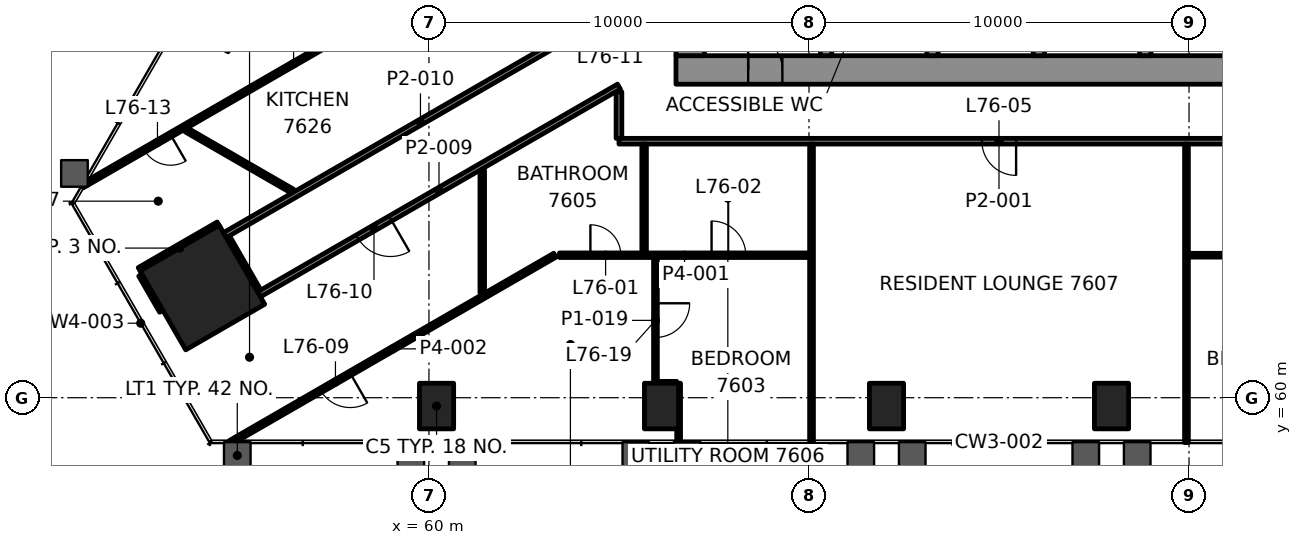
"""IFC4 building model, lengths in metres.
Left out: names, types, materials, properties, quantities, classifications, styles, units other than length and angle.
Written with IfcOpenShell. Run it as: python <this file> out.ifc"""

import sys

from ifc_helpers import new_model, si_unit, direction, frame, frame_2d, origin, origin_2d, place, context, subcontext, project, spatial, rectangle, hollow_rectangle, extrude, element, fill, save


model = new_model("IFC4")
c1 = context("Model", 3, precision=1e-05, world=origin(), true_north=direction((0.0, 1.0)))
c2 = subcontext(c1, "Body", "Model", "MODEL_VIEW")
j1 = project(units=[si_unit("LENGTHUNIT", "METRE"), si_unit("PLANEANGLEUNIT", "RADIAN")], contexts=[c1])
p1 = place(None, origin())
s1 = spatial("IfcSite", under=j1, at=p1, CompositionType="ELEMENT")
p2 = place(p1, origin())
s2 = spatial("IfcBuilding", under=s1, at=p2, CompositionType="ELEMENT")
p3 = place(p2, frame((0.0, 0.0, 312.6)))
s3 = spatial("IfcBuildingStorey", under=s2, at=p3, CompositionType="ELEMENT", Elevation=312.6)
p4 = place(p3, frame((54.039, 62.898, 0.0), z_axis=(0.0, 0.0, 1.0), x_axis=(0.5, -0.866025403784, 0.0)))
e1 = element("IfcColumn", 1, at=p4, inside=s3, PredefinedType="COLUMN", context=c2, shape_type="SweptSolid", body=[
    extrude(rectangle(XDim=2.4, YDim=2.4, at=origin_2d()), origin(), (0.0, 0.0, 1.0), 3.5),
])
for number, where, z_axis, x_axis in (
    (2, (60.2, 59.78, -0.0), (0.0, 0.0, 1.0), (1.0, 0.0, 0.0)),
    (3, (66.12, 59.78, -0.0), (0.0, 0.0, 1.0), (1.0, 0.0, 0.0)),
    (4, (72.04, 59.78, -0.0), (0.0, 0.0, 1.0), (1.0, 0.0, 0.0)),
    (5, (77.96, 59.78, -0.0), (0.0, 0.0, 1.0), (1.0, 0.0, 0.0)),
):
    element("IfcColumn", number, at=place(p3, frame(where, z_axis=z_axis, x_axis=x_axis)), inside=s3, PredefinedType="COLUMN", context=c2, shape_type="SweptSolid", body=[
        extrude(hollow_rectangle(XDim=0.9, YDim=1.2, WallThickness=0.06, at=origin_2d()), origin(), (0.0, 0.0, 1.0), 3.5),
    ])
p5 = place(p3, frame((66.5, 68.625, 0.0), z_axis=(0.0, 0.0, 1.0), x_axis=(1.0, 0.0, 0.0)))
e6 = element("IfcWall", 6, at=p5, inside=s3, PredefinedType="SHEAR", context=c2, shape_type="SweptSolid", body=[
    extrude(rectangle(XDim=17.0, YDim=0.75, at=frame_2d((8.5, 0.0))), origin(), (0.0, 0.0, 1.0), 3.3),
])
p6 = place(p5, frame((1.9, 0.0, 0.0)))
e7 = element("IfcOpeningElement", 7, at=p6, cuts=e6, PredefinedType="OPENING", context=c2, shape_type="SweptSolid", body=[
    extrude(rectangle(XDim=0.9, YDim=2.1, at=frame_2d((0.45, 1.05))), frame((0.0, 0.385, 0.0), z_axis=(0.0, -1.0, 0.0), x_axis=(1.0, 0.0, 0.0)), (0.0, 0.0, 1.0), 0.77),
])
p7 = place(p3, frame((66.875, 69.0, 0.0), z_axis=(0.0, 0.0, 1.0), x_axis=(0.0, 1.0, 0.0)))
e8 = element("IfcWall", 8, at=p7, inside=s3, PredefinedType="SHEAR", context=c2, shape_type="SweptSolid", body=[
    extrude(rectangle(XDim=12.0, YDim=0.75, at=frame_2d((6.0, 0.0))), origin(), (0.0, 0.0, 1.0), 3.3),
])
p8 = place(p7, frame((3.7, 0.0, 0.0)))
e9 = element("IfcOpeningElement", 9, at=p8, cuts=e8, PredefinedType="OPENING", context=c2, shape_type="SweptSolid", body=[
    extrude(rectangle(XDim=1.2, YDim=2.1, at=frame_2d((0.6, 1.05))), frame((0.0, 0.385, 0.0), z_axis=(0.0, -1.0, 0.0), x_axis=(1.0, 0.0, 0.0)), (0.0, 0.0, 1.0), 0.77),
])
for number, where, z_axis, x_axis in (
    (10, (70.45, 69.0, 0.0), (0.0, 0.0, 1.0), (0.0, 1.0, 0.0)),
    (11, (73.25, 69.0, 0.0), (0.0, 0.0, 1.0), (0.0, 1.0, 0.0)),
    (12, (76.05, 69.0, 0.0), (0.0, 0.0, 1.0), (0.0, 1.0, 0.0)),
    (13, (78.85, 69.0, 0.0), (0.0, 0.0, 1.0), (0.0, 1.0, 0.0)),
):
    element("IfcWall", number, at=place(p3, frame(where, z_axis=z_axis, x_axis=x_axis)), inside=s3, PredefinedType="SHEAR", context=c2, shape_type="SweptSolid", body=[
        extrude(rectangle(XDim=2.6, YDim=0.3, at=frame_2d((1.3, 0.0))), origin(), (0.0, 0.0, 1.0), 3.3),
    ])
p9 = place(p3, frame((66.02, 60.38, 0.0), z_axis=(0.0, 0.0, 1.0), x_axis=(1.0, 0.0, 0.0)))
e14 = element("IfcWall", 14, at=p9, inside=s3, PredefinedType="PARTITIONING", context=c2, shape_type="SweptSolid", body=[
    extrude(rectangle(XDim=0.5, YDim=0.1, at=frame_2d((0.25, 0.0))), origin(), (0.0, 0.0, 1.0), 2.7),
])
p10 = place(p3, frame((63.434, 63.75, 0.0), z_axis=(0.0, 0.0, 1.0), x_axis=(1.0, 0.0, 0.0)))
e15 = element("IfcWall", 15, at=p10, inside=s3, PredefinedType="PARTITIONING", context=c2, shape_type="SweptSolid", body=[
    extrude(rectangle(XDim=6.582, YDim=0.12, at=frame_2d((3.291, 0.0))), origin(), (0.0, 0.0, 1.0), 2.7),
])
p11 = place(p10, frame((0.814, 0.0, 0.0)))
e16 = element("IfcOpeningElement", 16, at=p11, cuts=e15, PredefinedType="OPENING", context=c2, shape_type="SweptSolid", body=[
    extrude(rectangle(XDim=0.8, YDim=2.1, at=frame_2d((0.4, 1.05))), frame((0.0, 0.07, 0.0), z_axis=(0.0, -1.0, 0.0), x_axis=(1.0, 0.0, 0.0)), (0.0, 0.0, 1.0), 0.14),
])
p12 = place(p10, frame((4.002, 0.0, 0.0)))
e17 = element("IfcOpeningElement", 17, at=p12, cuts=e15, PredefinedType="OPENING", context=c2, shape_type="SweptSolid", body=[
    extrude(rectangle(XDim=0.9, YDim=2.1, at=frame_2d((0.45, 1.05))), frame((0.0, 0.07, 0.0), z_axis=(0.0, -1.0, 0.0), x_axis=(1.0, 0.0, 0.0)), (0.0, 0.0, 1.0), 0.14),
])
p13 = place(p3, frame((86.566, 63.75, 0.0), z_axis=(0.0, 0.0, 1.0), x_axis=(-1.0, 0.0, 0.0)))
e18 = element("IfcWall", 18, at=p13, inside=s3, PredefinedType="PARTITIONING", context=c2, shape_type="SweptSolid", body=[
    extrude(rectangle(XDim=6.582, YDim=0.1, at=frame_2d((3.291, 0.0))), origin(), (0.0, 0.0, 1.0), 2.7),
])
p14 = place(p13, frame((0.913, 0.0, 0.0)))
e19 = element("IfcOpeningElement", 19, at=p14, cuts=e18, PredefinedType="OPENING", context=c2, shape_type="SweptSolid", body=[
    extrude(rectangle(XDim=0.9, YDim=2.1, at=frame_2d((0.45, 1.05))), frame((0.0, 0.06, 0.0), z_axis=(0.0, -1.0, 0.0), x_axis=(1.0, 0.0, 0.0)), (0.0, 0.0, 1.0), 0.12),
])
p15 = place(p3, frame((85.0, 66.75, 0.0), z_axis=(0.0, 0.0, 1.0), x_axis=(-1.0, 0.0, 0.0)))
e20 = element("IfcWall", 20, at=p15, inside=s3, PredefinedType="PARTITIONING", context=c2, shape_type="SweptSolid", body=[
    extrude(rectangle(XDim=20.0, YDim=0.15, at=frame_2d((10.0, 0.0))), origin(), (0.0, 0.0, 1.0), 2.7),
])
p16 = place(p15, frame((2.135, 0.0, 0.0)))
e21 = element("IfcOpeningElement", 21, at=p16, cuts=e20, PredefinedType="OPENING", context=c2, shape_type="SweptSolid", body=[
    extrude(rectangle(XDim=1.0, YDim=2.1, at=frame_2d((0.5, 1.05))), frame((0.0, 0.085, 0.0), z_axis=(0.0, -1.0, 0.0), x_axis=(1.0, 0.0, 0.0)), (0.0, 0.0, 1.0), 0.17),
])
p17 = place(p15, frame((9.55, 0.0, 0.0)))
e22 = element("IfcOpeningElement", 22, at=p17, cuts=e20, PredefinedType="OPENING", context=c2, shape_type="SweptSolid", body=[
    extrude(rectangle(XDim=0.9, YDim=2.1, at=frame_2d((0.45, 1.05))), frame((0.0, 0.085, 0.0), z_axis=(0.0, -1.0, 0.0), x_axis=(1.0, 0.0, 0.0)), (0.0, 0.0, 1.0), 0.17),
])
p18 = place(p3, frame((63.314, 63.75, 0.0), z_axis=(0.0, 0.0, 1.0), x_axis=(-0.866028066272, -0.499995388408, 0.0)))
e23 = element("IfcWall", 23, at=p18, inside=s3, PredefinedType="PARTITIONING", context=c2, shape_type="SweptSolid", body=[
    extrude(rectangle(XDim=9.859, YDim=0.12, at=frame_2d((4.93, 0.0))), origin(), (0.0, 0.0, 1.0), 2.7),
])
p19 = place(p18, frame((6.218, 0.0, 0.0)))
e24 = element("IfcOpeningElement", 24, at=p19, cuts=e23, PredefinedType="OPENING", context=c2, shape_type="SweptSolid", body=[
    extrude(rectangle(XDim=0.9, YDim=2.1, at=frame_2d((0.45, 1.05))), frame((0.0, 0.07, 0.0), z_axis=(0.0, -1.0, 0.0), x_axis=(1.0, 0.0, 0.0)), (0.0, 0.0, 1.0), 0.14),
])
p20 = place(p3, frame((65.0, 68.187, 0.0), z_axis=(0.0, 0.0, 1.0), x_axis=(-0.866028339337, -0.499994915439, 0.0)))
e25 = element("IfcWall", 25, at=p20, inside=s3, PredefinedType="PARTITIONING", context=c2, shape_type="SweptSolid", body=[
    extrude(rectangle(XDim=10.937, YDim=0.15, at=frame_2d((5.468, 0.0))), origin(), (0.0, 0.0, 1.0), 2.697),
])
p21 = place(p20, frame((6.943, 0.0, 0.0)))
e26 = element("IfcOpeningElement", 26, at=p21, cuts=e25, PredefinedType="OPENING", context=c2, shape_type="SweptSolid", body=[
    extrude(rectangle(XDim=1.0, YDim=2.1, at=frame_2d((0.5, 1.05))), frame((0.0, 0.085, 0.0), z_axis=(0.0, -1.0, 0.0), x_axis=(1.0, 0.0, 0.0)), (0.0, 0.0, 1.0), 0.17),
])
p22 = place(p3, frame((54.628, 64.278, 0.0), z_axis=(0.0, 0.0, 1.0), x_axis=(0.866033426221, 0.499986104476, 0.0)))
e27 = element("IfcWall", 27, at=p22, inside=s3, PredefinedType="PARTITIONING", context=c2, shape_type="SweptSolid", body=[
    extrude(rectangle(XDim=11.89, YDim=0.15, at=frame_2d((5.945, 0.0))), origin(), (0.0, 0.0, 1.0), 2.7),
])
p23 = place(p22, frame((10.612, 0.0, 0.0)))
e28 = element("IfcOpeningElement", 28, at=p23, cuts=e27, PredefinedType="OPENING", context=c2, shape_type="SweptSolid", body=[
    extrude(rectangle(XDim=1.0, YDim=2.1, at=frame_2d((0.5, 1.05))), frame((0.0, 0.085, 0.0), z_axis=(0.0, -1.0, 0.0), x_axis=(1.0, 0.0, 0.0)), (0.0, 0.0, 1.0), 0.17),
])
p24 = place(p3, frame((52.4, 63.337, 0.0), z_axis=(0.0, 0.0, 1.0), x_axis=(0.866024647952, 0.500001309137, 0.0)))
e29 = element("IfcWall", 29, at=p24, inside=s3, PredefinedType="PARTITIONING", context=c2, shape_type="SweptSolid", body=[
    extrude(rectangle(XDim=2.4, YDim=0.2, at=frame_2d((1.2, 0.0))), origin(), (0.0, 0.0, 1.0), 2.7),
])
p25 = place(p3, frame((62.0, 71.998, 0.0), z_axis=(0.0, 0.0, 1.0), x_axis=(-0.866023842607, -0.500002704028, 0.0)))
e30 = element("IfcWall", 30, at=p25, inside=s3, PredefinedType="PARTITIONING", context=c2, shape_type="SweptSolid", body=[
    extrude(rectangle(XDim=12.845, YDim=0.12, at=frame_2d((6.422, 0.0))), origin(), (0.0, 0.0, 1.0), 2.7),
])
p26 = place(p25, frame((0.421, 0.0, 0.0)))
e31 = element("IfcOpeningElement", 31, at=p26, cuts=e30, PredefinedType="OPENING", context=c2, shape_type="SweptSolid", body=[
    extrude(rectangle(XDim=0.8, YDim=2.1, at=frame_2d((0.4, 1.05))), frame((0.0, 0.07, 0.0), z_axis=(0.0, -1.0, 0.0), x_axis=(1.0, 0.0, 0.0)), (0.0, 0.0, 1.0), 0.14),
])
p27 = place(p25, frame((10.158, 0.0, 0.0)))
e32 = element("IfcOpeningElement", 32, at=p27, cuts=e30, PredefinedType="OPENING", context=c2, shape_type="SweptSolid", body=[
    extrude(rectangle(XDim=0.8, YDim=2.1, at=frame_2d((0.4, 1.05))), frame((0.0, 0.07, 0.0), z_axis=(0.0, -1.0, 0.0), x_axis=(1.0, 0.0, 0.0)), (0.0, 0.0, 1.0), 0.14),
])
for number, where, z_axis, x_axis in (
    (33, (79.933, 58.82, 0.0), (0.0, 0.0, 1.0), (0.0, 1.0, 0.0)),
    (34, (70.067, 58.82, 0.0), (0.0, 0.0, 1.0), (0.0, 1.0, 0.0)),
):
    element("IfcWall", number, at=place(p3, frame(where, z_axis=z_axis, x_axis=x_axis)), inside=s3, PredefinedType="PARTITIONING", context=c2, shape_type="SweptSolid", body=[
        extrude(rectangle(XDim=7.855, YDim=0.1, at=frame_2d((3.927, 0.0))), origin(), (0.0, 0.0, 1.0), 2.688),
    ])
p28 = place(p3, frame((66.57, 58.82, 0.0), z_axis=(0.0, 0.0, 1.0), x_axis=(0.0, 1.0, 0.0)))
e35 = element("IfcWall", 35, at=p28, inside=s3, PredefinedType="PARTITIONING", context=c2, shape_type="SweptSolid", body=[
    extrude(rectangle(XDim=1.56, YDim=0.1, at=frame_2d((0.78, 0.0))), origin(), (0.0, 0.0, 1.0), 2.688),
])
p29 = place(p3, frame((65.96, 63.69, 0.0), z_axis=(0.0, 0.0, 1.0), x_axis=(0.0, -1.0, 0.0)))
e36 = element("IfcWall", 36, at=p29, inside=s3, PredefinedType="PARTITIONING", context=c2, shape_type="SweptSolid", body=[
    extrude(rectangle(XDim=3.31, YDim=0.1, at=frame_2d((1.655, 0.0))), origin(), (0.0, 0.0, 1.0), 2.7),
])
p30 = place(p29, frame((1.205, 0.0, 0.0)))
e37 = element("IfcOpeningElement", 37, at=p30, cuts=e36, PredefinedType="OPENING", context=c2, shape_type="SweptSolid", body=[
    extrude(rectangle(XDim=0.9, YDim=2.1, at=frame_2d((0.45, 1.05))), frame((0.0, 0.06, 0.0), z_axis=(0.0, -1.0, 0.0), x_axis=(1.0, 0.0, 0.0)), (0.0, 0.0, 1.0), 0.12),
])
p31 = place(p3, frame((65.662, 63.81, 0.0), z_axis=(0.0, 0.0, 1.0), x_axis=(0.0, 1.0, 0.0)))
e38 = element("IfcWall", 38, at=p31, inside=s3, PredefinedType="PARTITIONING", context=c2, shape_type="SweptSolid", body=[
    extrude(rectangle(XDim=2.865, YDim=0.12, at=frame_2d((1.433, 0.0))), origin(), (0.0, 0.0, 1.0), 2.7),
])
p32 = place(p3, frame((65.0, 66.825, 0.0), z_axis=(0.0, 0.0, 1.0), x_axis=(0.0, 1.0, 0.0)))
e39 = element("IfcWall", 39, at=p32, inside=s3, PredefinedType="PARTITIONING", context=c2, shape_type="SweptSolid", body=[
    extrude(rectangle(XDim=1.226, YDim=0.15, at=frame_2d((0.613, 0.0))), origin(), (0.0, 0.0, 1.0), 2.697),
])
p33 = place(p3, frame((61.403, 62.756, 0.0), z_axis=(0.0, 0.0, 1.0), x_axis=(0.0, 1.0, 0.0)))
e40 = element("IfcWall", 40, at=p33, inside=s3, PredefinedType="PARTITIONING", context=c2, shape_type="SweptSolid", body=[
    extrude(rectangle(XDim=3.228, YDim=0.12, at=frame_2d((1.614, 0.0))), origin(), (0.0, 0.0, 1.0), 2.697),
])
p34 = place(p3, frame((55.49, 62.784, 0.0), z_axis=(0.0, 0.0, 1.0), x_axis=(-0.499970888758, 0.866042210515, 0.0)))
e41 = element("IfcWall", 41, at=p34, inside=s3, PredefinedType="PARTITIONING", context=c2, shape_type="SweptSolid", body=[
    extrude(rectangle(XDim=1.645, YDim=0.2, at=frame_2d((0.822, 0.0))), origin(), (0.0, 0.0, 1.0), 2.697),
])
p35 = place(p3, frame((53.0, 62.298, 0.0), z_axis=(0.0, 0.0, 1.0), x_axis=(-0.50002983664, 0.866008176907, 0.0)))
e42 = element("IfcWall", 42, at=p35, inside=s3, PredefinedType="PARTITIONING", context=c2, shape_type="SweptSolid", body=[
    extrude(rectangle(XDim=1.1, YDim=0.2, at=frame_2d((0.55, 0.0))), origin(), (0.0, 0.0, 1.0), 2.7),
])
p36 = place(p3, frame((56.41, 65.433, 0.0), z_axis=(0.0, 0.0, 1.0), x_axis=(-0.866000447062, 0.500043223821, 0.0)))
e43 = element("IfcWall", 43, at=p36, inside=s3, PredefinedType="PARTITIONING", context=c2, shape_type="SweptSolid", body=[
    extrude(rectangle(XDim=3.228, YDim=0.12, at=frame_2d((1.614, 0.0))), origin(), (0.0, 0.0, 1.0), 2.7),
])
p37 = place(p11, origin())
e44 = element("IfcDoor", 44, at=p37, inside=s3, OperationType="SINGLE_SWING_RIGHT", PredefinedType="DOOR", context=c2, shape_type="SweptSolid", body=[
    extrude(rectangle(XDim=0.8, YDim=2.1, at=frame_2d((0.4, 1.05))), frame((0.0, 0.025, 0.0), z_axis=(0.0, -1.0, 0.0), x_axis=(1.0, 0.0, 0.0)), (0.0, 0.0, 1.0), 0.05),
])
fill(e16, e44)
p38 = place(p12, origin())
e45 = element("IfcDoor", 45, at=p38, inside=s3, OperationType="SINGLE_SWING_LEFT", PredefinedType="DOOR", context=c2, shape_type="SweptSolid", body=[
    extrude(rectangle(XDim=0.9, YDim=2.1, at=frame_2d((0.45, 1.05))), frame((0.0, 0.025, 0.0), z_axis=(0.0, -1.0, 0.0), x_axis=(1.0, 0.0, 0.0)), (0.0, 0.0, 1.0), 0.05),
])
fill(e17, e45)
p39 = place(p17, origin())
e46 = element("IfcDoor", 46, at=p39, inside=s3, OperationType="SINGLE_SWING_LEFT", PredefinedType="DOOR", context=c2, shape_type="SweptSolid", body=[
    extrude(rectangle(XDim=0.9, YDim=2.1, at=frame_2d((0.45, 1.05))), frame((0.0, 0.025, 0.0), z_axis=(0.0, -1.0, 0.0), x_axis=(1.0, 0.0, 0.0)), (0.0, 0.0, 1.0), 0.05),
])
fill(e22, e46)
p40 = place(p19, origin())
e47 = element("IfcDoor", 47, at=p40, inside=s3, OperationType="SINGLE_SWING_RIGHT", PredefinedType="DOOR", context=c2, shape_type="SweptSolid", body=[
    extrude(rectangle(XDim=0.9, YDim=2.1, at=frame_2d((0.45, 1.05))), frame((0.0, 0.025, 0.0), z_axis=(0.0, -1.0, 0.0), x_axis=(1.0, 0.0, 0.0)), (0.0, 0.0, 1.0), 0.05),
])
fill(e24, e47)
p41 = place(p21, origin())
e48 = element("IfcDoor", 48, at=p41, inside=s3, OperationType="SINGLE_SWING_LEFT", PredefinedType="DOOR", context=c2, shape_type="SweptSolid", body=[
    extrude(rectangle(XDim=1.0, YDim=2.1, at=frame_2d((0.5, 1.05))), frame((0.0, 0.025, 0.0), z_axis=(0.0, -1.0, 0.0), x_axis=(1.0, 0.0, 0.0)), (0.0, 0.0, 1.0), 0.05),
])
fill(e26, e48)
p42 = place(p27, origin())
e49 = element("IfcDoor", 49, at=p42, inside=s3, OperationType="SINGLE_SWING_RIGHT", PredefinedType="DOOR", context=c2, shape_type="SweptSolid", body=[
    extrude(rectangle(XDim=0.8, YDim=2.1, at=frame_2d((0.4, 1.05))), frame((0.0, 0.025, 0.0), z_axis=(0.0, -1.0, 0.0), x_axis=(1.0, 0.0, 0.0)), (0.0, 0.0, 1.0), 0.05),
])
fill(e32, e49)
p43 = place(p30, origin())
e50 = element("IfcDoor", 50, at=p43, inside=s3, OperationType="SINGLE_SWING_RIGHT", PredefinedType="DOOR", context=c2, shape_type="SweptSolid", body=[
    extrude(rectangle(XDim=0.9, YDim=2.1, at=frame_2d((0.45, 1.05))), frame((0.0, 0.025, 0.0), z_axis=(0.0, -1.0, 0.0), x_axis=(1.0, 0.0, 0.0)), (0.0, 0.0, 1.0), 0.05),
])
fill(e37, e50)
p44 = place(p6, origin())
e51 = element("IfcDoor", 51, at=p44, inside=s3, OperationType="SINGLE_SWING_RIGHT", PredefinedType="DOOR", context=c2, shape_type="SweptSolid", body=[
    extrude(rectangle(XDim=0.9, YDim=2.1, at=frame_2d((0.45, 1.05))), frame((0.0, 0.095, 0.0), z_axis=(0.0, -1.0, 0.0), x_axis=(1.0, 0.0, 0.0)), (0.0, 0.0, 1.0), 0.19),
])
fill(e7, e51)
save(model, sys.argv[1])
